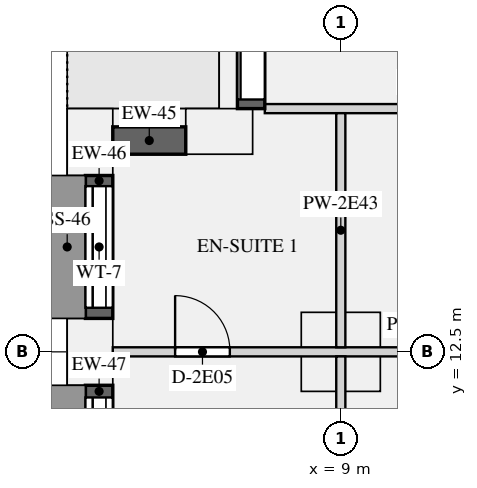
"""IFC4 building model, lengths in metres.
Left out: names, types, materials, properties, quantities, classifications, styles, units other than length and angle.
Written with IfcOpenShell. Run it as: python <this file> out.ifc"""

import sys

from ifc_helpers import new_model, si_unit, direction, frame, frame_2d, origin, origin_2d, place, context, subcontext, project, spatial, rectangle, extrude, element, fill, save


model = new_model("IFC4")
c1 = context("Model", 3, precision=1e-05, world=origin(), true_north=direction((0.0, 1.0)))
c2 = subcontext(c1, "Body", "Model", "MODEL_VIEW")
j1 = project(units=[si_unit("LENGTHUNIT", "METRE"), si_unit("PLANEANGLEUNIT", "RADIAN")], contexts=[c1])
p1 = place(None, origin())
s1 = spatial("IfcSite", under=j1, at=p1, CompositionType="ELEMENT")
p2 = place(p1, origin())
s2 = spatial("IfcBuilding", under=s1, at=p2, CompositionType="ELEMENT")
p3 = place(p2, frame((0.0, 0.0, 118.2)))
s3 = spatial("IfcBuildingStorey", under=s2, at=p3, CompositionType="ELEMENT", Elevation=118.2)
for number, where, z_axis, x_axis in (
    (1, (7.0, 16.125, 0.0), (0.0, 0.0, 1.0), (-1.0, 0.0, 0.0)),
    (2, (4.875, 15.95, 0.0), (0.0, 0.0, 1.0), (0.0, -1.0, 0.0)),
    (3, (4.875, 12.5, 0.0), (0.0, 0.0, 1.0), (0.0, -1.0, 0.0)),
):
    element("IfcColumn", number, at=place(p3, frame(where, z_axis=z_axis, x_axis=x_axis)), inside=s3, PredefinedType="USERDEFINED", context=c2, shape_type="SweptSolid", body=[
        extrude(rectangle(XDim=1.1, YDim=0.75, at=origin_2d()), origin(), (0.0, 0.0, 1.0), 3.15),
    ])
p4 = place(p3, frame((9.0, 12.5, 0.0), z_axis=(0.0, 0.0, 1.0), x_axis=(1.0, 0.0, 0.0)))
e4 = element("IfcColumn", 4, at=p4, inside=s3, PredefinedType="COLUMN", context=c2, shape_type="SweptSolid", body=[
    extrude(rectangle(XDim=1.3, YDim=1.3, at=origin_2d()), origin(), (0.0, 0.0, 1.0), 3.15),
])
p5 = place(p3, frame((7.525, 19.95, 0.0), z_axis=(0.0, 0.0, 1.0), x_axis=(0.0, -1.0, 0.0)))
e5 = element("IfcWall", 5, at=p5, inside=s3, PredefinedType="SOLIDWALL", context=c2, shape_type="SweptSolid", body=[
    extrude(rectangle(XDim=3.45, YDim=0.45, at=frame_2d((1.725, 0.0))), origin(), (0.0, 0.0, 1.0), 2.83),
])
p6 = place(p5, frame((0.15, 0.0, 0.0)))
e6 = element("IfcOpeningElement", 6, at=p6, cuts=e5, PredefinedType="OPENING", context=c2, shape_type="SweptSolid", body=[
    extrude(rectangle(XDim=3.15, YDim=2.3, at=frame_2d((1.575, 1.15))), frame((0.0, 0.235, 0.0), z_axis=(0.0, -1.0, 0.0), x_axis=(1.0, 0.0, 0.0)), (0.0, 0.0, 1.0), 0.47),
])
p7 = place(p3, frame((6.45, 15.975, 0.9), z_axis=(0.0, 0.0, 1.0), x_axis=(-1.0, 0.0, 0.0)))
e7 = element("IfcWall", 7, at=p7, inside=s3, PredefinedType="SOLIDWALL", context=c2, shape_type="SweptSolid", body=[
    extrude(rectangle(XDim=1.2, YDim=0.45, at=frame_2d((0.6, 0.0))), origin(), (0.0, 0.0, 1.0), 1.93),
])
p8 = place(p3, frame((5.025, 15.4, 0.9), z_axis=(0.0, 0.0, 1.0), x_axis=(0.0, -1.0, 0.0)))
e8 = element("IfcWall", 8, at=p8, inside=s3, PredefinedType="SOLIDWALL", context=c2, shape_type="SweptSolid", body=[
    extrude(rectangle(XDim=2.35, YDim=0.45, at=frame_2d((1.175, 0.0))), origin(), (0.0, 0.0, 1.0), 1.93),
])
p9 = place(p8, frame((0.175, 0.0, 0.15)))
e9 = element("IfcOpeningElement", 9, at=p9, cuts=e8, PredefinedType="OPENING", context=c2, shape_type="SweptSolid", body=[
    extrude(rectangle(XDim=2.0, YDim=1.5, at=frame_2d((1.0, 0.75))), frame((0.0, 0.235, 0.0), z_axis=(0.0, -1.0, 0.0), x_axis=(1.0, 0.0, 0.0)), (0.0, 0.0, 1.0), 0.47),
])
p10 = place(p3, frame((5.025, 11.95, 0.9), z_axis=(0.0, 0.0, 1.0), x_axis=(0.0, -1.0, 0.0)))
e10 = element("IfcWall", 10, at=p10, inside=s3, PredefinedType="SOLIDWALL", context=c2, shape_type="SweptSolid", body=[
    extrude(rectangle(XDim=2.9, YDim=0.45, at=frame_2d((1.45, 0.0))), origin(), (0.0, 0.0, 1.0), 1.93),
])
p11 = place(p10, frame((0.2, 0.0, 0.15)))
e11 = element("IfcOpeningElement", 11, at=p11, cuts=e10, PredefinedType="OPENING", context=c2, shape_type="SweptSolid", body=[
    extrude(rectangle(XDim=2.5, YDim=1.5, at=frame_2d((1.25, 0.75))), frame((0.0, 0.235, 0.0), z_axis=(0.0, -1.0, 0.0), x_axis=(1.0, 0.0, 0.0)), (0.0, 0.0, 1.0), 0.47),
])
p12 = place(p3, frame((5.25, 12.5, 0.0), z_axis=(0.0, 0.0, 1.0), x_axis=(1.0, 0.0, 0.0)))
e12 = element("IfcWall", 12, at=p12, inside=s3, PredefinedType="PARTITIONING", context=c2, shape_type="SweptSolid", body=[
    extrude(rectangle(XDim=8.325, YDim=0.15, at=frame_2d((4.163, 0.0))), origin(), (0.0, 0.0, 1.0), 2.83),
])
p13 = place(p12, frame((1.025, 0.0, 0.0)))
e13 = element("IfcOpeningElement", 13, at=p13, cuts=e12, PredefinedType="OPENING", context=c2, shape_type="SweptSolid", body=[
    extrude(rectangle(XDim=0.9, YDim=2.1, at=frame_2d((0.45, 1.05))), frame((0.0, 0.085, 0.0), z_axis=(0.0, -1.0, 0.0), x_axis=(1.0, 0.0, 0.0)), (0.0, 0.0, 1.0), 0.17),
])
p14 = place(p3, frame((7.75, 16.5, 0.0), z_axis=(0.0, 0.0, 1.0), x_axis=(1.0, 0.0, 0.0)))
e14 = element("IfcWall", 14, at=p14, inside=s3, PredefinedType="PARTITIONING", context=c2, shape_type="SweptSolid", body=[
    extrude(rectangle(XDim=5.675, YDim=0.15, at=frame_2d((2.837, 0.0))), origin(), (0.0, 0.0, 1.0), 2.83),
])
p15 = place(p3, frame((9.0, 5.25, 0.0), z_axis=(0.0, 0.0, 1.0), x_axis=(0.0, 1.0, 0.0)))
e15 = element("IfcWall", 15, at=p15, inside=s3, PredefinedType="PARTITIONING", context=c2, shape_type="SweptSolid", body=[
    extrude(rectangle(XDim=7.175, YDim=0.15, at=frame_2d((3.587, 0.0))), origin(), (0.0, 0.0, 1.0), 2.83),
])
p16 = place(p15, frame((4.475, 0.0, 0.0)))
e16 = element("IfcOpeningElement", 16, at=p16, cuts=e15, PredefinedType="OPENING", context=c2, shape_type="SweptSolid", body=[
    extrude(rectangle(XDim=0.9, YDim=2.1, at=frame_2d((0.45, 1.05))), frame((0.0, 0.085, 0.0), z_axis=(0.0, -1.0, 0.0), x_axis=(1.0, 0.0, 0.0)), (0.0, 0.0, 1.0), 0.17),
])
p17 = place(p3, frame((9.0, 12.575, 0.0), z_axis=(0.0, 0.0, 1.0), x_axis=(0.0, 1.0, 0.0)))
e17 = element("IfcWall", 17, at=p17, inside=s3, PredefinedType="PARTITIONING", context=c2, shape_type="SweptSolid", body=[
    extrude(rectangle(XDim=3.85, YDim=0.15, at=frame_2d((1.925, 0.0))), origin(), (0.0, 0.0, 1.0), 2.83),
])
p18 = place(p6, origin())
e18 = element("IfcDoor", 18, at=p18, inside=s3, OperationType="SLIDING_TO_LEFT", PredefinedType="DOOR", context=c2, shape_type="SweptSolid", body=[
    extrude(rectangle(XDim=3.15, YDim=2.3, at=frame_2d((1.575, 1.15))), frame((0.0, -0.07, 0.0), z_axis=(0.0, -1.0, 0.0), x_axis=(1.0, 0.0, 0.0)), (0.0, 0.0, 1.0), 0.05),
])
fill(e6, e18)
p19 = place(p9, origin())
e19 = element("IfcWindow", 19, at=p19, inside=s3, PartitioningType="SINGLE_PANEL", PredefinedType="WINDOW", context=c2, shape_type="SweptSolid", body=[
    extrude(rectangle(XDim=2.0, YDim=1.5, at=frame_2d((1.0, 0.75))), frame((0.0, -0.065, 0.0), z_axis=(0.0, -1.0, 0.0), x_axis=(1.0, 0.0, 0.0)), (0.0, 0.0, 1.0), 0.06),
])
fill(e9, e19)
p20 = place(p11, origin())
e20 = element("IfcWindow", 20, at=p20, inside=s3, PartitioningType="SINGLE_PANEL", PredefinedType="WINDOW", context=c2, shape_type="SweptSolid", body=[
    extrude(rectangle(XDim=2.5, YDim=1.5, at=frame_2d((1.25, 0.75))), frame((0.0, -0.065, 0.0), z_axis=(0.0, -1.0, 0.0), x_axis=(1.0, 0.0, 0.0)), (0.0, 0.0, 1.0), 0.06),
])
fill(e11, e20)
p21 = place(p13, origin())
e21 = element("IfcDoor", 21, at=p21, inside=s3, OperationType="SINGLE_SWING_LEFT", PredefinedType="DOOR", context=c2, shape_type="SweptSolid", body=[
    extrude(rectangle(XDim=0.9, YDim=2.1, at=frame_2d((0.45, 1.05))), frame((0.0, 0.025, 0.0), z_axis=(0.0, -1.0, 0.0), x_axis=(1.0, 0.0, 0.0)), (0.0, 0.0, 1.0), 0.05),
])
fill(e13, e21)
save(model, sys.argv[1])
